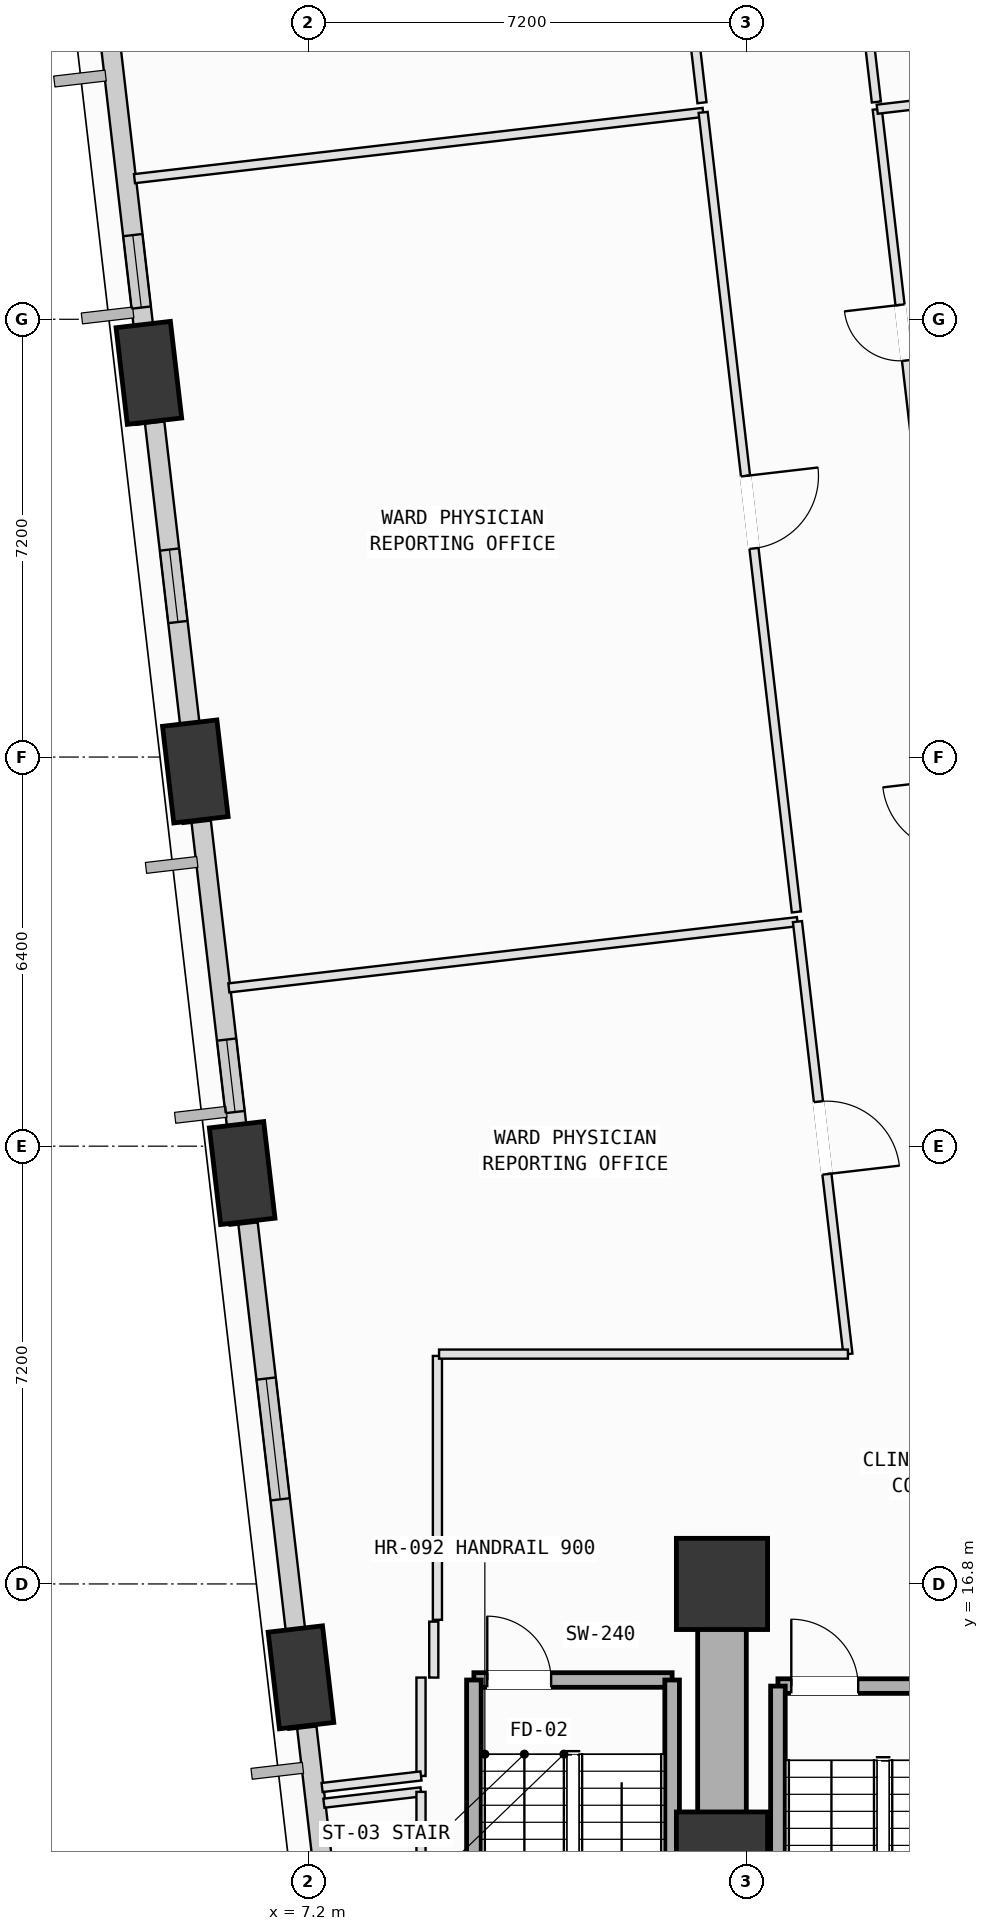
"""IFC4 building model, lengths in metres.
Left out: names, types, materials, properties, quantities, classifications, styles, units other than length and angle.
Written with IfcOpenShell. Run it as: python <this file> out.ifc"""

import sys

from ifc_helpers import new_model, si_unit, direction, frame, frame_2d, origin, origin_2d, place, context, subcontext, project, spatial, rectangle, extrude, element, fill, save


model = new_model("IFC4")
c1 = context("Model", 3, precision=1e-05, world=origin(), true_north=direction((0.0, 1.0)))
c2 = subcontext(c1, "Body", "Model", "MODEL_VIEW")
j1 = project(units=[si_unit("LENGTHUNIT", "METRE"), si_unit("PLANEANGLEUNIT", "RADIAN")], contexts=[c1])
p1 = place(None, origin())
s1 = spatial("IfcSite", under=j1, at=p1, CompositionType="ELEMENT")
p2 = place(p1, origin())
s2 = spatial("IfcBuilding", under=s1, at=p2, CompositionType="ELEMENT")
p3 = place(p2, frame((0.0, 0.0, 51.0)))
s3 = spatial("IfcBuildingStorey", under=s2, at=p3, CompositionType="ELEMENT", Elevation=51.0)
for number, where, z_axis, x_axis in (
    (1, (14.0, 12.3, 0.0), (0.0, 0.0, 1.0), (1.0, 0.0, 0.0)),
    (2, (14.0, 16.8, 0.0), (0.0, 0.0, 1.0), (1.0, 0.0, 0.0)),
):
    element("IfcColumn", number, at=place(p3, frame(where, z_axis=z_axis, x_axis=x_axis)), inside=s3, PredefinedType="COLUMN", context=c2, shape_type="SweptSolid", body=[
        extrude(rectangle(XDim=1.5, YDim=1.5, at=origin_2d()), origin(), (0.0, 0.0, 1.0), 4.0),
    ])
p4 = place(p3, frame((3.833, 43.076, 0.002), z_axis=(-0.073999121688, -0.122727301492, 0.989677795779), x_axis=(0.408416071098, 0.901628458186, 0.142346184554)))
e3 = element("IfcColumn", 3, at=p4, inside=s3, PredefinedType="COLUMN", context=c2, shape_type="SweptSolid", body=[
    extrude(rectangle(XDim=1.6, YDim=0.9, at=origin_2d()), origin(), (0.0, 0.0, 1.0), 4.038),
])
p5 = place(p3, frame((4.574, 36.719, 0.002), z_axis=(-0.04803764479, -0.119700360788, 0.991647219686), x_axis=(0.259374888745, 0.957241855929, 0.128112046065)))
e4 = element("IfcColumn", 4, at=p5, inside=s3, PredefinedType="COLUMN", context=c2, shape_type="SweptSolid", body=[
    extrude(rectangle(XDim=1.6, YDim=0.9, at=origin_2d()), origin(), (0.0, 0.0, 1.0), 4.03),
])
p6 = place(p3, frame((5.339, 30.163, 0.002), z_axis=(-0.021108966862, -0.116463265443, 0.992970653806), x_axis=(0.061951698396, 0.991130959428, 0.117564485836)))
e5 = element("IfcColumn", 5, at=p6, inside=s3, PredefinedType="COLUMN", context=c2, shape_type="SweptSolid", body=[
    extrude(rectangle(XDim=1.6, YDim=0.9, at=origin_2d()), origin(), (0.0, 0.0, 1.0), 4.025),
])
p7 = place(p3, frame((6.109, 23.558, 0.002), z_axis=(0.006069361117, -0.113193584828, 0.993554414821), x_axis=(-0.168477247489, 0.979253855238, 0.112593534806)))
e6 = element("IfcColumn", 6, at=p7, inside=s3, PredefinedType="COLUMN", context=c2, shape_type="SweptSolid", body=[
    extrude(rectangle(XDim=1.6, YDim=0.9, at=origin_2d()), origin(), (0.0, 0.0, 1.0), 4.022),
])
p8 = place(p3, frame((7.076, 15.264, 0.002), z_axis=(0.040166444647, -0.108910525893, 0.993239726387), x_axis=(-0.450019213992, 0.885544220461, 0.115300219633)))
e7 = element("IfcColumn", 7, at=p8, inside=s3, PredefinedType="COLUMN", context=c2, shape_type="SweptSolid", body=[
    extrude(rectangle(XDim=1.6, YDim=0.9, at=origin_2d()), origin(), (0.0, 0.0, 1.0), 4.024),
])
p9 = place(p3, frame((4.532, 37.083, 0.0), z_axis=(0.0, 0.0, 1.0), x_axis=(-0.11578615957, 0.993274164192, 0.0)))
e8 = element("IfcWall", 8, at=p9, inside=s3, PredefinedType="SOLIDWALL", context=c2, shape_type="SweptSolid", body=[
    extrude(rectangle(XDim=5.223, YDim=0.32, at=frame_2d((2.611, 0.0))), origin(), (0.0, 0.0, 1.0), 3.165),
])
p10 = place(p9, frame((0.715, 0.0, 0.75)))
e9 = element("IfcOpeningElement", 9, at=p10, cuts=e8, PredefinedType="OPENING", context=c2, shape_type="SweptSolid", body=[
    extrude(rectangle(XDim=1.2, YDim=1.75, at=frame_2d((0.6, 0.875))), frame((0.0, 0.17, 0.0), z_axis=(0.0, -1.0, 0.0), x_axis=(1.0, 0.0, 0.0)), (0.0, 0.0, 1.0), 0.34),
])
p11 = place(p3, frame((5.295, 30.537, 0.0), z_axis=(0.0, 0.0, 1.0), x_axis=(-0.115818260526, 0.993270421652, 0.0)))
e10 = element("IfcWall", 10, at=p11, inside=s3, PredefinedType="SOLIDWALL", context=c2, shape_type="SweptSolid", body=[
    extrude(rectangle(XDim=5.401, YDim=0.32, at=frame_2d((2.7, 0.0))), origin(), (0.0, 0.0, 1.0), 3.165),
])
p12 = place(p11, frame((2.098, 0.0, 0.75)))
e11 = element("IfcOpeningElement", 11, at=p12, cuts=e10, PredefinedType="OPENING", context=c2, shape_type="SweptSolid", body=[
    extrude(rectangle(XDim=1.2, YDim=1.75, at=frame_2d((0.6, 0.875))), frame((0.0, 0.17, 0.0), z_axis=(0.0, -1.0, 0.0), x_axis=(1.0, 0.0, 0.0)), (0.0, 0.0, 1.0), 0.34),
])
p13 = place(p3, frame((6.065, 23.936, 0.0), z_axis=(0.0, 0.0, 1.0), x_axis=(-0.115830501052, 0.993268994294, 0.0)))
e12 = element("IfcWall", 12, at=p13, inside=s3, PredefinedType="SOLIDWALL", context=c2, shape_type="SweptSolid", body=[
    extrude(rectangle(XDim=5.438, YDim=0.32, at=frame_2d((2.719, 0.0))), origin(), (0.0, 0.0, 1.0), 3.165),
])
p14 = place(p13, frame((0.63, 0.0, 0.75)))
e13 = element("IfcOpeningElement", 13, at=p14, cuts=e12, PredefinedType="OPENING", context=c2, shape_type="SweptSolid", body=[
    extrude(rectangle(XDim=1.2, YDim=1.75, at=frame_2d((0.6, 0.875))), frame((0.0, 0.17, 0.0), z_axis=(0.0, -1.0, 0.0), x_axis=(1.0, 0.0, 0.0)), (0.0, 0.0, 1.0), 0.34),
])
p15 = place(p3, frame((7.032, 15.64, 0.0), z_axis=(0.0, 0.0, 1.0), x_axis=(-0.115803071299, 0.993272192643, 0.0)))
e14 = element("IfcWall", 14, at=p15, inside=s3, PredefinedType="SOLIDWALL", context=c2, shape_type="SweptSolid", body=[
    extrude(rectangle(XDim=7.136, YDim=0.32, at=frame_2d((3.568, 0.0))), origin(), (0.0, 0.0, 1.0), 3.165),
])
p16 = place(p15, frame((2.569, 0.0, 0.75)))
e15 = element("IfcOpeningElement", 15, at=p16, cuts=e14, PredefinedType="OPENING", context=c2, shape_type="SweptSolid", body=[
    extrude(rectangle(XDim=2.0, YDim=1.95, at=frame_2d((1.0, 0.975))), frame((0.0, 0.17, 0.0), z_axis=(0.0, -1.0, 0.0), x_axis=(1.0, 0.0, 0.0)), (0.0, 0.0, 1.0), 0.34),
])
p17 = place(p3, frame((7.867, 8.48, 0.0), z_axis=(0.0, 0.0, 1.0), x_axis=(-0.115818446975, 0.993270399911, 0.0)))
e16 = element("IfcWall", 16, at=p17, inside=s3, PredefinedType="SOLIDWALL", context=c2, shape_type="SweptSolid", body=[
    extrude(rectangle(XDim=5.997, YDim=0.32, at=frame_2d((2.999, 0.0))), origin(), (0.0, 0.0, 1.0), 3.165),
])
p18 = place(p17, frame((1.562, 0.0, 0.75)))
e17 = element("IfcOpeningElement", 17, at=p18, cuts=e16, PredefinedType="OPENING", context=c2, shape_type="SweptSolid", body=[
    extrude(rectangle(XDim=1.4, YDim=1.85, at=frame_2d((0.7, 0.925))), frame((0.0, 0.17, 0.0), z_axis=(0.0, -1.0, 0.0), x_axis=(1.0, 0.0, 0.0)), (0.0, 0.0, 1.0), 0.34),
])
p19 = place(p3, frame((14.92, 15.12, 0.0), z_axis=(0.0, 0.0, 1.0), x_axis=(1.0, 0.0, 0.0)))
e18 = element("IfcWall", 18, at=p19, inside=s3, PredefinedType="SOLIDWALL", context=c2, shape_type="SweptSolid", body=[
    extrude(rectangle(XDim=3.46, YDim=0.24, at=frame_2d((1.73, 0.0))), origin(), (0.0, 0.0, 1.0), 3.78),
])
p20 = place(p19, frame((0.22, 0.0, 0.0)))
e19 = element("IfcOpeningElement", 19, at=p20, cuts=e18, PredefinedType="OPENING", context=c2, shape_type="SweptSolid", body=[
    extrude(rectangle(XDim=1.1, YDim=2.15, at=frame_2d((0.55, 1.075))), frame((0.0, 0.13, 0.0), z_axis=(0.0, -1.0, 0.0), x_axis=(1.0, 0.0, 0.0)), (0.0, 0.0, 1.0), 0.26),
])
p21 = place(p3, frame((14.92, 8.2, 0.0), z_axis=(0.0, 0.0, 1.0), x_axis=(0.0, 1.0, 0.0)))
e20 = element("IfcWall", 20, at=p21, inside=s3, PredefinedType="SOLIDWALL", context=c2, shape_type="SweptSolid", body=[
    extrude(rectangle(XDim=6.92, YDim=0.24, at=frame_2d((3.46, 0.0))), origin(), (0.0, 0.0, 1.0), 3.78),
])
p22 = place(p3, frame((9.92, 15.22, 0.0), z_axis=(0.0, 0.0, 1.0), x_axis=(1.0, 0.0, 0.0)))
e21 = element("IfcWall", 21, at=p22, inside=s3, PredefinedType="SOLIDWALL", context=c2, shape_type="SweptSolid", body=[
    extrude(rectangle(XDim=3.26, YDim=0.24, at=frame_2d((1.63, 0.0))), origin(), (0.0, 0.0, 1.0), 3.78),
])
p23 = place(p22, frame((0.22, 0.0, 0.0)))
e22 = element("IfcOpeningElement", 22, at=p23, cuts=e21, PredefinedType="OPENING", context=c2, shape_type="SweptSolid", body=[
    extrude(rectangle(XDim=1.05, YDim=2.15, at=frame_2d((0.525, 1.075))), frame((0.0, 0.13, 0.0), z_axis=(0.0, -1.0, 0.0), x_axis=(1.0, 0.0, 0.0)), (0.0, 0.0, 1.0), 0.26),
])
for number, where, z_axis, x_axis in (
    (23, (13.18, 15.22, 0.0), (0.0, 0.0, 1.0), (0.0, -1.0, 0.0)),
    (24, (9.92, 8.17, 0.0), (0.0, 0.0, 1.0), (0.0, 1.0, 0.0)),
):
    element("IfcWall", number, at=place(p3, frame(where, z_axis=z_axis, x_axis=x_axis)), inside=s3, PredefinedType="SOLIDWALL", context=c2, shape_type="SweptSolid", body=[
        extrude(rectangle(XDim=7.05, YDim=0.24, at=frame_2d((3.525, 0.0))), origin(), (0.0, 0.0, 1.0), 3.78),
    ])
p24 = place(p3, frame((14.0, 16.8, 0.0), z_axis=(0.0, 0.0, 1.0), x_axis=(0.0, -1.0, 0.0)))
e25 = element("IfcWall", 25, at=p24, inside=s3, PredefinedType="SHEAR", context=c2, shape_type="SweptSolid", body=[
    extrude(rectangle(XDim=9.0, YDim=0.8, at=frame_2d((4.5, 0.0))), origin(), (0.0, 0.0, 1.0), 3.78),
])
p25 = place(p3, frame((7.453, 13.194, 0.0), z_axis=(0.0, 0.0, 1.0), x_axis=(0.99330211286, 0.115546149172, 0.0)))
e26 = element("IfcWall", 26, at=p25, inside=s3, PredefinedType="PARTITIONING", context=c2, shape_type="SweptSolid", body=[
    extrude(rectangle(XDim=1.608, YDim=0.15, at=frame_2d((0.804, 0.0))), origin(), (0.0, 0.0, 1.0), 3.78),
])
p26 = place(p3, frame((9.05, 13.38, 0.0), z_axis=(0.0, 0.0, 1.0), x_axis=(0.0, -1.0, 0.0)))
e27 = element("IfcWall", 27, at=p26, inside=s3, PredefinedType="PARTITIONING", context=c2, shape_type="SweptSolid", body=[
    extrude(rectangle(XDim=5.88, YDim=0.15, at=frame_2d((2.94, 0.0))), origin(), (0.0, 0.0, 1.0), 3.78),
])
p27 = place(p3, frame((9.32, 20.55, 0.0), z_axis=(0.0, 0.0, 1.0), x_axis=(0.0, -1.0, 0.0)))
e28 = element("IfcWall", 28, at=p27, inside=s3, PredefinedType="PARTITIONING", context=c2, shape_type="SweptSolid", body=[
    extrude(rectangle(XDim=4.34, YDim=0.15, at=frame_2d((2.17, 0.0))), origin(), (0.0, 0.0, 1.0), 3.78),
])
p28 = place(p3, frame((9.26, 16.18, 0.0), z_axis=(0.0, 0.0, 1.0), x_axis=(0.0, -1.0, 0.0)))
e29 = element("IfcWall", 29, at=p28, inside=s3, PredefinedType="PARTITIONING", context=c2, shape_type="SweptSolid", body=[
    extrude(rectangle(XDim=0.92, YDim=0.15, at=frame_2d((0.46, 0.0))), origin(), (0.0, 0.0, 1.0), 3.78),
])
p29 = place(p3, frame((9.05, 15.26, 0.0), z_axis=(0.0, 0.0, 1.0), x_axis=(0.0, -1.0, 0.0)))
e30 = element("IfcWall", 30, at=p29, inside=s3, PredefinedType="PARTITIONING", context=c2, shape_type="SweptSolid", body=[
    extrude(rectangle(XDim=1.618, YDim=0.15, at=frame_2d((0.809, 0.0))), origin(), (0.0, 0.0, 1.0), 3.78),
])
p30 = place(p3, frame((9.05, 13.642, 0.0), z_axis=(0.0, 0.0, 1.0), x_axis=(-0.993236809011, -0.116106163598, 0.0)))
e31 = element("IfcWall", 31, at=p30, inside=s3, PredefinedType="PARTITIONING", context=c2, shape_type="SweptSolid", body=[
    extrude(rectangle(XDim=1.638, YDim=0.15, at=frame_2d((0.819, 0.0))), origin(), (0.0, 0.0, 1.0), 3.78),
])
p31 = place(p3, frame((6.943, 14.411, 0.0), z_axis=(0.0, 0.0, 1.0), x_axis=(-0.115787826705, 0.993273969853, 0.0)))
e32 = element("IfcWall", 32, at=p31, inside=s3, PredefinedType="PARTITIONING", context=c2, shape_type="SweptSolid", body=[
    extrude(rectangle(XDim=1.21, YDim=0.15, at=frame_2d((0.605, 0.0))), origin(), (0.0, 0.0, 1.0), 3.165),
])
p32 = place(p3, frame((5.977, 22.702, 0.0), z_axis=(0.0, 0.0, 1.0), x_axis=(-0.116118535525, 0.993235362695, 0.0)))
e33 = element("IfcWall", 33, at=p32, inside=s3, PredefinedType="PARTITIONING", context=c2, shape_type="SweptSolid", body=[
    extrude(rectangle(XDim=1.215, YDim=0.15, at=frame_2d((0.608, 0.0))), origin(), (0.0, 0.0, 1.0), 3.165),
])
p33 = place(p3, frame((5.89, 26.603, 0.0), z_axis=(0.0, 0.0, 1.0), x_axis=(0.993273780871, 0.115789447851, 0.0)))
e34 = element("IfcWall", 34, at=p33, inside=s3, PredefinedType="PARTITIONING", context=c2, shape_type="SweptSolid", body=[
    extrude(rectangle(XDim=9.414, YDim=0.15, at=frame_2d((4.707, 0.0))), origin(), (0.0, 0.0, 1.0), 3.78),
])
p34 = place(p3, frame((15.241, 27.693, 0.0), z_axis=(0.0, 0.0, 1.0), x_axis=(0.115911530518, -0.993259541657, 0.0)))
e35 = element("IfcWall", 35, at=p34, inside=s3, PredefinedType="PARTITIONING", context=c2, shape_type="SweptSolid", body=[
    extrude(rectangle(XDim=7.161, YDim=0.15, at=frame_2d((3.581, 0.0))), origin(), (0.0, 0.0, 1.0), 3.78),
])
p35 = place(p34, frame((2.981, 0.0, 0.0)))
e36 = element("IfcOpeningElement", 36, at=p35, cuts=e35, PredefinedType="OPENING", context=c2, shape_type="SweptSolid", body=[
    extrude(rectangle(XDim=1.2, YDim=2.15, at=frame_2d((0.6, 1.075))), frame((0.0, 0.085, 0.0), z_axis=(0.0, -1.0, 0.0), x_axis=(1.0, 0.0, 0.0)), (0.0, 0.0, 1.0), 0.17),
])
p36 = place(p3, frame((16.071, 20.58, 0.0), z_axis=(0.0, 0.0, 1.0), x_axis=(-1.0, 0.0, 0.0)))
e37 = element("IfcWall", 37, at=p36, inside=s3, PredefinedType="PARTITIONING", context=c2, shape_type="SweptSolid", body=[
    extrude(rectangle(XDim=6.724, YDim=0.15, at=frame_2d((3.362, 0.0))), origin(), (0.0, 0.0, 1.0), 3.78),
])
p37 = place(p3, frame((4.338, 39.913, 0.0), z_axis=(0.0, 0.0, 1.0), x_axis=(0.993278152999, 0.11575193638, 0.0)))
e38 = element("IfcWall", 38, at=p37, inside=s3, PredefinedType="PARTITIONING", context=c2, shape_type="SweptSolid", body=[
    extrude(rectangle(XDim=9.415, YDim=0.15, at=frame_2d((4.708, 0.0))), origin(), (0.0, 0.0, 1.0), 3.78),
])
p38 = place(p3, frame((13.69, 41.003, 0.0), z_axis=(0.0, 0.0, 1.0), x_axis=(0.11578306798, -0.993274524575, 0.0)))
e39 = element("IfcWall", 39, at=p38, inside=s3, PredefinedType="PARTITIONING", context=c2, shape_type="SweptSolid", body=[
    extrude(rectangle(XDim=13.24, YDim=0.15, at=frame_2d((6.62, 0.0))), origin(), (0.0, 0.0, 1.0), 2.865),
])
p39 = place(p38, frame((6.02, 0.0, 0.0)))
e40 = element("IfcOpeningElement", 40, at=p39, cuts=e39, PredefinedType="OPENING", context=c2, shape_type="SweptSolid", body=[
    extrude(rectangle(XDim=1.2, YDim=2.15, at=frame_2d((0.6, 1.075))), frame((0.0, 0.085, 0.0), z_axis=(0.0, -1.0, 0.0), x_axis=(1.0, 0.0, 0.0)), (0.0, 0.0, 1.0), 0.17),
])
p40 = place(p3, frame((5.207, 29.31, 0.0), z_axis=(0.0, 0.0, 1.0), x_axis=(-0.11599699892, 0.993249563927, 0.0)))
e41 = element("IfcWall", 41, at=p40, inside=s3, PredefinedType="PARTITIONING", context=c2, shape_type="SweptSolid", body=[
    extrude(rectangle(XDim=1.208, YDim=0.15, at=frame_2d((0.604, 0.0))), origin(), (0.0, 0.0, 1.0), 3.165),
])
p41 = place(p3, frame((4.441, 35.874, 0.0), z_axis=(0.0, 0.0, 1.0), x_axis=(-0.115924557338, 0.993258021365, 0.0)))
e42 = element("IfcWall", 42, at=p41, inside=s3, PredefinedType="PARTITIONING", context=c2, shape_type="SweptSolid", body=[
    extrude(rectangle(XDim=1.19, YDim=0.15, at=frame_2d((0.595, 0.0))), origin(), (0.0, 0.0, 1.0), 3.165),
])
p42 = place(p3, frame((12.889, 47.872, 0.0), z_axis=(0.0, 0.0, 1.0), x_axis=(0.115757094982, -0.993277551826, 0.0)))
e43 = element("IfcWall", 43, at=p42, inside=s3, PredefinedType="PARTITIONING", context=c2, shape_type="SweptSolid", body=[
    extrude(rectangle(XDim=6.755, YDim=0.15, at=frame_2d((3.378, 0.0))), origin(), (0.0, 0.0, 1.0), 2.865),
])
p43 = place(p42, frame((2.778, 0.0, 0.0)))
e44 = element("IfcOpeningElement", 44, at=p43, cuts=e43, PredefinedType="OPENING", context=c2, shape_type="SweptSolid", body=[
    extrude(rectangle(XDim=1.2, YDim=2.15, at=frame_2d((0.6, 1.075))), frame((0.0, 0.085, 0.0), z_axis=(0.0, -1.0, 0.0), x_axis=(1.0, 0.0, 0.0)), (0.0, 0.0, 1.0), 0.17),
])
p44 = place(p3, frame((17.41, 33.705, 0.0), z_axis=(0.0, 0.0, 1.0), x_axis=(-0.115807460553, 0.993271680901, 0.0)))
e45 = element("IfcWall", 45, at=p44, inside=s3, PredefinedType="PARTITIONING", context=c2, shape_type="SweptSolid", body=[
    extrude(rectangle(XDim=7.4, YDim=0.15, at=frame_2d((3.7, 0.0))), origin(), (0.0, 0.0, 1.0), 3.78),
])
p45 = place(p44, frame((3.24, 0.0, 0.0)))
e46 = element("IfcOpeningElement", 46, at=p45, cuts=e45, PredefinedType="OPENING", context=c2, shape_type="SweptSolid", body=[
    extrude(rectangle(XDim=0.92, YDim=2.1, at=frame_2d((0.46, 1.05))), frame((0.0, 0.085, 0.0), z_axis=(0.0, -1.0, 0.0), x_axis=(1.0, 0.0, 0.0)), (0.0, 0.0, 1.0), 0.17),
])
p46 = place(p3, frame((16.553, 41.055, 0.0), z_axis=(0.0, 0.0, 1.0), x_axis=(0.993268624582, 0.115833671357, 0.0)))
e47 = element("IfcWall", 47, at=p46, inside=s3, PredefinedType="PARTITIONING", context=c2, shape_type="SweptSolid", body=[
    extrude(rectangle(XDim=8.365, YDim=0.15, at=frame_2d((4.183, 0.0))), origin(), (0.0, 0.0, 1.0), 3.78),
])
p47 = place(p3, frame((16.539, 41.174, 0.0), z_axis=(0.0, 0.0, 1.0), x_axis=(-0.115766090086, 0.99327650349, 0.0)))
e48 = element("IfcWall", 48, at=p47, inside=s3, PredefinedType="PARTITIONING", context=c2, shape_type="SweptSolid", body=[
    extrude(rectangle(XDim=7.075, YDim=0.15, at=frame_2d((3.538, 0.0))), origin(), (0.0, 0.0, 1.0), 3.78),
])
p48 = place(p47, frame((3.078, 0.0, 0.0)))
e49 = element("IfcOpeningElement", 49, at=p48, cuts=e48, PredefinedType="OPENING", context=c2, shape_type="SweptSolid", body=[
    extrude(rectangle(XDim=0.92, YDim=2.1, at=frame_2d((0.46, 1.05))), frame((0.0, 0.085, 0.0), z_axis=(0.0, -1.0, 0.0), x_axis=(1.0, 0.0, 0.0)), (0.0, 0.0, 1.0), 0.17),
])
p49 = place(p10, origin())
e50 = element("IfcWindow", 50, at=p49, inside=s3, PartitioningType="SINGLE_PANEL", PredefinedType="WINDOW", context=c2, shape_type="SweptSolid", body=[
    extrude(rectangle(XDim=1.2, YDim=1.75, at=frame_2d((0.6, 0.875))), frame((0.0, 0.03, 0.0), z_axis=(0.0, -1.0, 0.0), x_axis=(1.0, 0.0, 0.0)), (0.0, 0.0, 1.0), 0.06),
])
fill(e9, e50)
p50 = place(p12, origin())
e51 = element("IfcWindow", 51, at=p50, inside=s3, PartitioningType="SINGLE_PANEL", PredefinedType="WINDOW", context=c2, shape_type="SweptSolid", body=[
    extrude(rectangle(XDim=1.2, YDim=1.75, at=frame_2d((0.6, 0.875))), frame((0.0, 0.03, 0.0), z_axis=(0.0, -1.0, 0.0), x_axis=(1.0, 0.0, 0.0)), (0.0, 0.0, 1.0), 0.06),
])
fill(e11, e51)
p51 = place(p14, origin())
e52 = element("IfcWindow", 52, at=p51, inside=s3, PartitioningType="SINGLE_PANEL", PredefinedType="WINDOW", context=c2, shape_type="SweptSolid", body=[
    extrude(rectangle(XDim=1.2, YDim=1.75, at=frame_2d((0.6, 0.875))), frame((0.0, 0.03, 0.0), z_axis=(0.0, -1.0, 0.0), x_axis=(1.0, 0.0, 0.0)), (0.0, 0.0, 1.0), 0.06),
])
fill(e13, e52)
p52 = place(p16, origin())
e53 = element("IfcWindow", 53, at=p52, inside=s3, PartitioningType="SINGLE_PANEL", PredefinedType="WINDOW", context=c2, shape_type="SweptSolid", body=[
    extrude(rectangle(XDim=2.0, YDim=1.95, at=frame_2d((1.0, 0.975))), frame((0.0, 0.03, 0.0), z_axis=(0.0, -1.0, 0.0), x_axis=(1.0, 0.0, 0.0)), (0.0, 0.0, 1.0), 0.06),
])
fill(e15, e53)
p53 = place(p20, origin())
e54 = element("IfcDoor", 54, at=p53, inside=s3, OperationType="SINGLE_SWING_LEFT", PredefinedType="DOOR", context=c2, shape_type="SweptSolid", body=[
    extrude(rectangle(XDim=1.1, YDim=2.15, at=frame_2d((0.55, 1.075))), frame((0.0, 0.025, 0.0), z_axis=(0.0, -1.0, 0.0), x_axis=(1.0, 0.0, 0.0)), (0.0, 0.0, 1.0), 0.05),
])
fill(e19, e54)
p54 = place(p23, origin())
e55 = element("IfcDoor", 55, at=p54, inside=s3, OperationType="SINGLE_SWING_LEFT", PredefinedType="DOOR", context=c2, shape_type="SweptSolid", body=[
    extrude(rectangle(XDim=1.05, YDim=2.15, at=frame_2d((0.525, 1.075))), frame((0.0, 0.025, 0.0), z_axis=(0.0, -1.0, 0.0), x_axis=(1.0, 0.0, 0.0)), (0.0, 0.0, 1.0), 0.05),
])
fill(e22, e55)
p55 = place(p35, origin())
e56 = element("IfcDoor", 56, at=p55, inside=s3, OperationType="SINGLE_SWING_RIGHT", PredefinedType="DOOR", context=c2, shape_type="SweptSolid", body=[
    extrude(rectangle(XDim=1.2, YDim=2.15, at=frame_2d((0.6, 1.075))), frame((0.0, 0.025, 0.0), z_axis=(0.0, -1.0, 0.0), x_axis=(1.0, 0.0, 0.0)), (0.0, 0.0, 1.0), 0.05),
])
fill(e36, e56)
p56 = place(p39, origin())
e57 = element("IfcDoor", 57, at=p56, inside=s3, OperationType="SINGLE_SWING_LEFT", PredefinedType="DOOR", context=c2, shape_type="SweptSolid", body=[
    extrude(rectangle(XDim=1.2, YDim=2.15, at=frame_2d((0.6, 1.075))), frame((0.0, 0.025, 0.0), z_axis=(0.0, -1.0, 0.0), x_axis=(1.0, 0.0, 0.0)), (0.0, 0.0, 1.0), 0.05),
])
fill(e40, e57)
p57 = place(p45, origin())
e58 = element("IfcDoor", 58, at=p57, inside=s3, OperationType="SINGLE_SWING_RIGHT", PredefinedType="DOOR", context=c2, shape_type="SweptSolid", body=[
    extrude(rectangle(XDim=0.92, YDim=2.1, at=frame_2d((0.46, 1.05))), frame((0.0, 0.025, 0.0), z_axis=(0.0, -1.0, 0.0), x_axis=(1.0, 0.0, 0.0)), (0.0, 0.0, 1.0), 0.05),
])
fill(e46, e58)
save(model, sys.argv[1])
